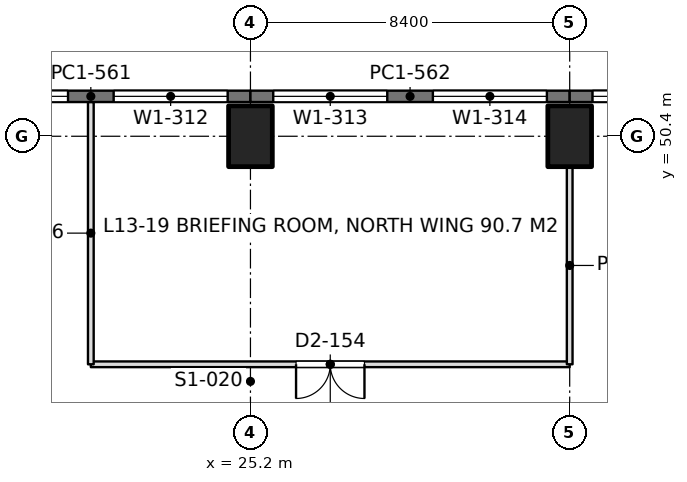
"""IFC4 building model, lengths in metres.
Left out: names, types, materials, properties, quantities, classifications, styles, units other than length and angle.
Written with IfcOpenShell. Run it as: python <this file> out.ifc"""

import sys

from ifc_helpers import new_model, si_unit, direction, frame, frame_2d, origin, origin_2d, place, context, subcontext, project, spatial, rectangle, extrude, element, fill, save


model = new_model("IFC4")
c1 = context("Model", 3, precision=1e-05, world=origin(), true_north=direction((0.0, 1.0)))
c2 = subcontext(c1, "Body", "Model", "MODEL_VIEW")
j1 = project(units=[si_unit("LENGTHUNIT", "METRE"), si_unit("PLANEANGLEUNIT", "RADIAN")], contexts=[c1])
p1 = place(None, origin())
s1 = spatial("IfcSite", under=j1, at=p1, CompositionType="ELEMENT")
p2 = place(p1, origin())
s2 = spatial("IfcBuilding", under=s1, at=p2, CompositionType="ELEMENT")
p3 = place(p2, frame((0.0, 0.0, 59.4)))
s3 = spatial("IfcBuildingStorey", under=s2, at=p3, CompositionType="ELEMENT", Elevation=59.4)
for number, where, z_axis, x_axis in (
    (1, (25.2, 50.4, 0.0), (0.0, 0.0, 1.0), (1.0, 0.0, 0.0)),
    (2, (33.6, 50.4, 0.0), (0.0, 0.0, 1.0), (1.0, 0.0, 0.0)),
):
    element("IfcColumn", number, at=place(p3, frame(where, z_axis=z_axis, x_axis=x_axis)), inside=s3, PredefinedType="COLUMN", context=c2, shape_type="SweptSolid", body=[
        extrude(rectangle(XDim=1.15, YDim=1.6, at=origin_2d()), origin(), (0.0, 0.0, 1.0), 4.5),
    ])
p4 = place(p3, frame((16.8, 51.45, 0.0), z_axis=(0.0, 0.0, 1.0), x_axis=(1.0, 0.0, 0.0)))
e3 = element("IfcWall", 3, at=p4, inside=s3, PredefinedType="SOLIDWALL", context=c2, shape_type="SweptSolid", body=[
    extrude(rectangle(XDim=8.4, YDim=0.3, at=frame_2d((4.2, 0.0))), origin(), (0.0, 0.0, 1.0), 4.34),
])
p5 = place(p4, frame((0.6, 0.0, 0.9)))
e4 = element("IfcOpeningElement", 4, at=p5, cuts=e3, PredefinedType="OPENING", context=c2, shape_type="SweptSolid", body=[
    extrude(rectangle(XDim=3.0, YDim=1.9, at=frame_2d((1.5, 0.95))), frame((0.0, 0.16, 0.0), z_axis=(0.0, -1.0, 0.0), x_axis=(1.0, 0.0, 0.0)), (0.0, 0.0, 1.0), 0.32),
])
p6 = place(p4, frame((4.8, 0.0, 0.9)))
e5 = element("IfcOpeningElement", 5, at=p6, cuts=e3, PredefinedType="OPENING", context=c2, shape_type="SweptSolid", body=[
    extrude(rectangle(XDim=3.0, YDim=1.9, at=frame_2d((1.5, 0.95))), frame((0.0, 0.16, 0.0), z_axis=(0.0, -1.0, 0.0), x_axis=(1.0, 0.0, 0.0)), (0.0, 0.0, 1.0), 0.32),
])
p7 = place(p3, frame((25.2, 51.45, 0.0), z_axis=(0.0, 0.0, 1.0), x_axis=(1.0, 0.0, 0.0)))
e6 = element("IfcWall", 6, at=p7, inside=s3, PredefinedType="SOLIDWALL", context=c2, shape_type="SweptSolid", body=[
    extrude(rectangle(XDim=8.4, YDim=0.3, at=frame_2d((4.2, 0.0))), origin(), (0.0, 0.0, 1.0), 4.34),
])
p8 = place(p7, frame((0.6, 0.0, 0.9)))
e7 = element("IfcOpeningElement", 7, at=p8, cuts=e6, PredefinedType="OPENING", context=c2, shape_type="SweptSolid", body=[
    extrude(rectangle(XDim=3.0, YDim=1.9, at=frame_2d((1.5, 0.95))), frame((0.0, 0.16, 0.0), z_axis=(0.0, -1.0, 0.0), x_axis=(1.0, 0.0, 0.0)), (0.0, 0.0, 1.0), 0.32),
])
p9 = place(p7, frame((4.8, 0.0, 0.9)))
e8 = element("IfcOpeningElement", 8, at=p9, cuts=e6, PredefinedType="OPENING", context=c2, shape_type="SweptSolid", body=[
    extrude(rectangle(XDim=3.0, YDim=1.9, at=frame_2d((1.5, 0.95))), frame((0.0, 0.16, 0.0), z_axis=(0.0, -1.0, 0.0), x_axis=(1.0, 0.0, 0.0)), (0.0, 0.0, 1.0), 0.32),
])
p10 = place(p3, frame((33.6, 51.45, 0.0), z_axis=(0.0, 0.0, 1.0), x_axis=(1.0, 0.0, 0.0)))
e9 = element("IfcWall", 9, at=p10, inside=s3, PredefinedType="SOLIDWALL", context=c2, shape_type="SweptSolid", body=[
    extrude(rectangle(XDim=8.4, YDim=0.3, at=frame_2d((4.2, 0.0))), origin(), (0.0, 0.0, 1.0), 4.34),
])
p11 = place(p10, frame((0.6, 0.0, 0.9)))
e10 = element("IfcOpeningElement", 10, at=p11, cuts=e9, PredefinedType="OPENING", context=c2, shape_type="SweptSolid", body=[
    extrude(rectangle(XDim=3.0, YDim=1.9, at=frame_2d((1.5, 0.95))), frame((0.0, 0.16, 0.0), z_axis=(0.0, -1.0, 0.0), x_axis=(1.0, 0.0, 0.0)), (0.0, 0.0, 1.0), 0.32),
])
p12 = place(p10, frame((4.8, 0.0, 0.9)))
e11 = element("IfcOpeningElement", 11, at=p12, cuts=e9, PredefinedType="OPENING", context=c2, shape_type="SweptSolid", body=[
    extrude(rectangle(XDim=3.0, YDim=1.9, at=frame_2d((1.5, 0.95))), frame((0.0, 0.16, 0.0), z_axis=(0.0, -1.0, 0.0), x_axis=(1.0, 0.0, 0.0)), (0.0, 0.0, 1.0), 0.32),
])
p13 = place(p3, frame((21.0, 44.4, 0.0), z_axis=(0.0, 0.0, 1.0), x_axis=(1.0, 0.0, 0.0)))
e12 = element("IfcWall", 12, at=p13, inside=s3, PredefinedType="PARTITIONING", context=c2, shape_type="SweptSolid", body=[
    extrude(rectangle(XDim=12.6, YDim=0.15, at=frame_2d((6.3, 0.0))), origin(), (0.0, 0.0, 1.0), 3.74),
])
p14 = place(p13, frame((5.4, 0.0, 0.0)))
e13 = element("IfcOpeningElement", 13, at=p14, cuts=e12, PredefinedType="OPENING", context=c2, shape_type="SweptSolid", body=[
    extrude(rectangle(XDim=1.8, YDim=2.2, at=frame_2d((0.9, 1.1))), frame((0.0, 0.085, 0.0), z_axis=(0.0, -1.0, 0.0), x_axis=(1.0, 0.0, 0.0)), (0.0, 0.0, 1.0), 0.17),
])
p15 = place(p3, frame((21.0, 44.4, 0.0), z_axis=(0.0, 0.0, 1.0), x_axis=(0.0, 1.0, 0.0)))
e14 = element("IfcWall", 14, at=p15, inside=s3, PredefinedType="PARTITIONING", context=c2, shape_type="SweptSolid", body=[
    extrude(rectangle(XDim=6.902, YDim=0.15, at=frame_2d((3.451, 0.0))), origin(), (0.0, 0.0, 1.0), 3.84),
])
p16 = place(p3, frame((33.6, 44.4, 0.0), z_axis=(0.0, 0.0, 1.0), x_axis=(0.0, 1.0, 0.0)))
e15 = element("IfcWall", 15, at=p16, inside=s3, PredefinedType="PARTITIONING", context=c2, shape_type="SweptSolid", body=[
    extrude(rectangle(XDim=5.201, YDim=0.15, at=frame_2d((2.601, 0.0))), origin(), (0.0, 0.0, 1.0), 3.74),
])
p17 = place(p5, origin())
e16 = element("IfcWindow", 16, at=p17, inside=s3, PartitioningType="SINGLE_PANEL", PredefinedType="WINDOW", context=c2, shape_type="SweptSolid", body=[
    extrude(rectangle(XDim=3.0, YDim=1.9, at=frame_2d((1.5, 0.95))), frame((0.0, 0.03, 0.0), z_axis=(0.0, -1.0, 0.0), x_axis=(1.0, 0.0, 0.0)), (0.0, 0.0, 1.0), 0.06),
])
fill(e4, e16)
p18 = place(p6, origin())
e17 = element("IfcWindow", 17, at=p18, inside=s3, PartitioningType="SINGLE_PANEL", PredefinedType="WINDOW", context=c2, shape_type="SweptSolid", body=[
    extrude(rectangle(XDim=3.0, YDim=1.9, at=frame_2d((1.5, 0.95))), frame((0.0, 0.03, 0.0), z_axis=(0.0, -1.0, 0.0), x_axis=(1.0, 0.0, 0.0)), (0.0, 0.0, 1.0), 0.06),
])
fill(e5, e17)
p19 = place(p8, origin())
e18 = element("IfcWindow", 18, at=p19, inside=s3, PartitioningType="SINGLE_PANEL", PredefinedType="WINDOW", context=c2, shape_type="SweptSolid", body=[
    extrude(rectangle(XDim=3.0, YDim=1.9, at=frame_2d((1.5, 0.95))), frame((0.0, 0.03, 0.0), z_axis=(0.0, -1.0, 0.0), x_axis=(1.0, 0.0, 0.0)), (0.0, 0.0, 1.0), 0.06),
])
fill(e7, e18)
p20 = place(p9, origin())
e19 = element("IfcWindow", 19, at=p20, inside=s3, PartitioningType="SINGLE_PANEL", PredefinedType="WINDOW", context=c2, shape_type="SweptSolid", body=[
    extrude(rectangle(XDim=3.0, YDim=1.9, at=frame_2d((1.5, 0.95))), frame((0.0, 0.03, 0.0), z_axis=(0.0, -1.0, 0.0), x_axis=(1.0, 0.0, 0.0)), (0.0, 0.0, 1.0), 0.06),
])
fill(e8, e19)
p21 = place(p11, origin())
e20 = element("IfcWindow", 20, at=p21, inside=s3, PartitioningType="SINGLE_PANEL", PredefinedType="WINDOW", context=c2, shape_type="SweptSolid", body=[
    extrude(rectangle(XDim=3.0, YDim=1.9, at=frame_2d((1.5, 0.95))), frame((0.0, 0.03, 0.0), z_axis=(0.0, -1.0, 0.0), x_axis=(1.0, 0.0, 0.0)), (0.0, 0.0, 1.0), 0.06),
])
fill(e10, e20)
p22 = place(p14, frame((1.8, 0.0, 0.0), z_axis=(0.0, 0.0, 1.0), x_axis=(-1.0, 0.0, 0.0)))
e21 = element("IfcDoor", 21, at=p22, inside=s3, OperationType="DOUBLE_DOOR_SINGLE_SWING", PredefinedType="DOOR", context=c2, shape_type="SweptSolid", body=[
    extrude(rectangle(XDim=1.8, YDim=2.2, at=frame_2d((0.9, 1.1))), frame((0.0, 0.025, 0.0), z_axis=(0.0, -1.0, 0.0), x_axis=(1.0, 0.0, 0.0)), (0.0, 0.0, 1.0), 0.05),
])
fill(e13, e21)
save(model, sys.argv[1])
